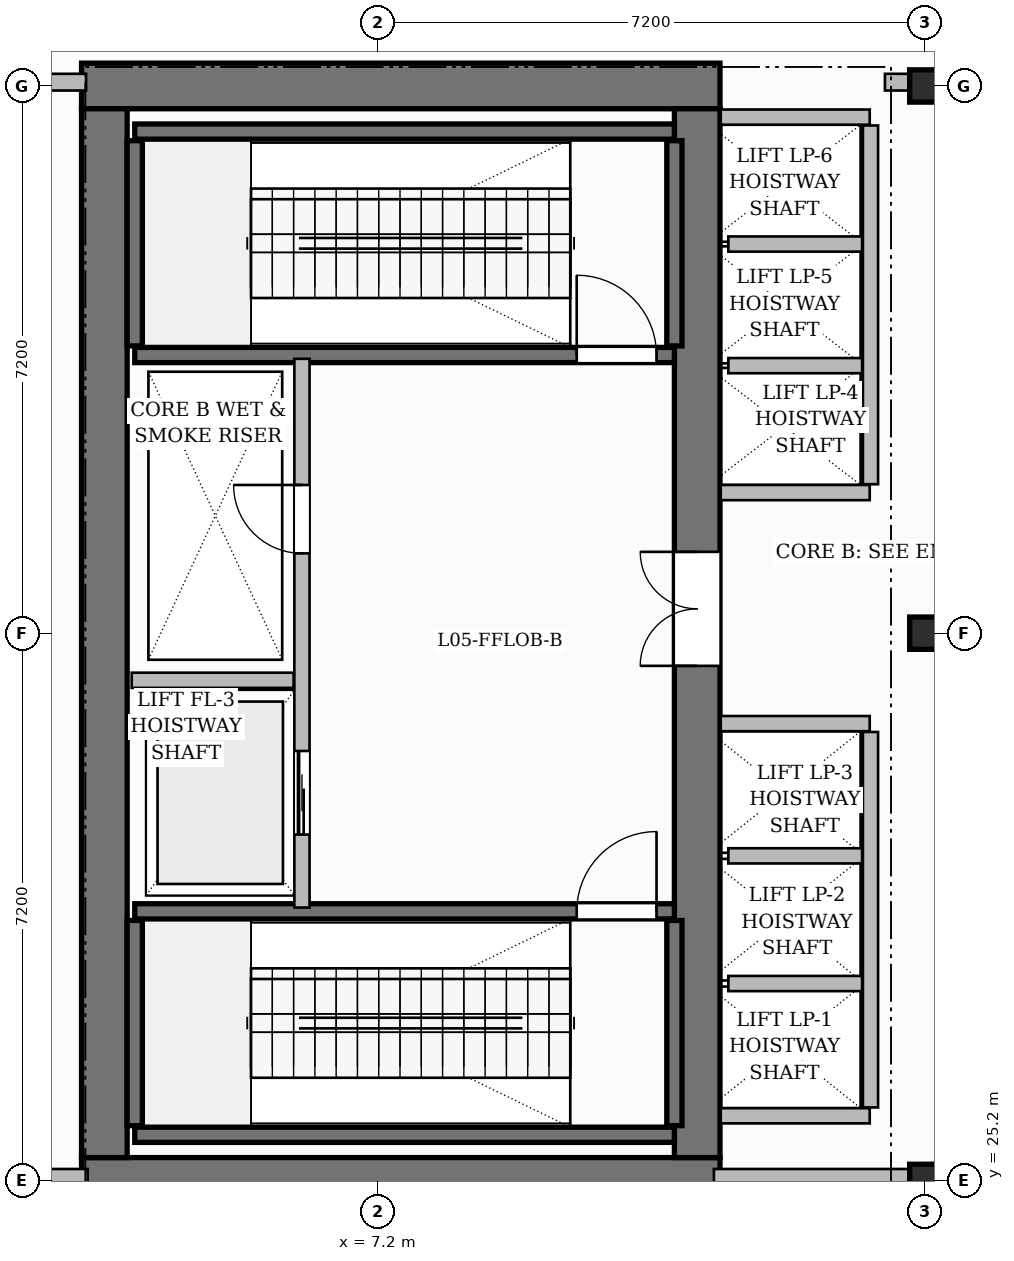
"""IFC4 building model, lengths in metres.
Left out: names, types, materials, properties, quantities, classifications, styles, units other than length and angle.
Written with IfcOpenShell. Run it as: python <this file> out.ifc"""

import sys

from ifc_helpers import new_model, si_unit, direction, frame, frame_2d, origin, origin_2d, place, context, subcontext, project, spatial, rectangle, i_section, extrude, source, transform, mapped, element, fill, save


model = new_model("IFC4")
c1 = context("Model", 3, precision=1e-05, world=origin(), true_north=direction((0.0, 1.0)))
c2 = subcontext(c1, "Body", "Model", "MODEL_VIEW")
j1 = project(units=[si_unit("LENGTHUNIT", "METRE"), si_unit("PLANEANGLEUNIT", "RADIAN")], contexts=[c1])
p1 = place(None, origin())
s1 = spatial("IfcSite", under=j1, at=p1, CompositionType="ELEMENT")
p2 = place(p1, origin())
s2 = spatial("IfcBuilding", under=s1, at=p2, CompositionType="ELEMENT")
p3 = place(p2, frame((0.0, 0.0, 27.0)))
s3 = spatial("IfcBuildingStorey", under=s2, at=p3, CompositionType="ELEMENT", Elevation=27.0)
for number, where, z_axis, x_axis in (
    (1, (3.3, 25.2, 0.0), (0.0, 0.0, 1.0), (1.0, 0.0, 0.0)),
    (2, (3.3, 39.6, 0.0), (0.0, 0.0, 1.0), (1.0, 0.0, 0.0)),
):
    element("IfcWall", number, at=place(p3, frame(where, z_axis=z_axis, x_axis=x_axis)), inside=s3, PredefinedType="SHEAR", context=c2, shape_type="SweptSolid", body=[
        extrude(rectangle(XDim=8.4, YDim=0.6, at=frame_2d((4.2, 0.0))), origin(), (0.0, 0.0, 1.0), 5.4),
    ])
p4 = place(p3, frame((3.6, 25.5, 0.0), z_axis=(0.0, 0.0, 1.0), x_axis=(0.0, 1.0, 0.0)))
e3 = element("IfcWall", 3, at=p4, inside=s3, PredefinedType="SHEAR", context=c2, shape_type="SweptSolid", body=[
    extrude(rectangle(XDim=13.8, YDim=0.6, at=frame_2d((6.9, 0.0))), origin(), (0.0, 0.0, 1.0), 5.4),
])
p5 = place(p3, frame((11.4, 25.5, 0.0), z_axis=(0.0, 0.0, 1.0), x_axis=(0.0, 1.0, 0.0)))
e4 = element("IfcWall", 4, at=p5, inside=s3, PredefinedType="SHEAR", context=c2, shape_type="SweptSolid", body=[
    extrude(rectangle(XDim=13.8, YDim=0.6, at=frame_2d((6.9, 0.0))), origin(), (0.0, 0.0, 1.0), 5.4),
])
p6 = place(p5, frame((6.47, 0.0, 0.0)))
e5 = element("IfcOpeningElement", 5, at=p6, cuts=e4, PredefinedType="OPENING", context=c2, shape_type="SweptSolid", body=[
    extrude(rectangle(XDim=1.5, YDim=2.2, at=frame_2d((0.75, 1.1))), frame((0.0, 0.31, 0.0), z_axis=(0.0, -1.0, 0.0), x_axis=(1.0, 0.0, 0.0)), (0.0, 0.0, 1.0), 0.62),
])
m1 = source(origin(), c2, "Body", "SweptSolid", [
    extrude(i_section(OverallWidth=0.409, OverallDepth=0.425, WebThickness=0.024, FlangeThickness=0.039, FilletRadius=0.015, at=origin_2d()), origin(), (0.0, 0.0, 1.0), 5.4),
])
for number, where, z_axis, x_axis in (
    (6, (14.4, 25.2, 0.0), (0.0, 0.0, 1.0), (1.0, 0.0, 0.0)),
    (7, (14.4, 32.4, 0.0), (0.0, 0.0, 1.0), (1.0, 0.0, 0.0)),
    (8, (14.4, 39.6, 0.0), (0.0, 0.0, 1.0), (1.0, 0.0, 0.0)),
):
    element("IfcColumn", number, at=place(p3, frame(where, z_axis=z_axis, x_axis=x_axis)), inside=s3, PredefinedType="COLUMN", context=c2, shape_type="MappedRepresentation", body=[
        mapped(m1, transform((0.0, 0.0, 0.0), scale=1.0)),
    ])
p7 = place(p3, frame((4.0, 25.8, 0.0), z_axis=(0.0, 0.0, 1.0), x_axis=(1.0, 0.0, 0.0)))
e9 = element("IfcWall", 9, at=p7, inside=s3, PredefinedType="SHEAR", context=c2, shape_type="SweptSolid", body=[
    extrude(rectangle(XDim=7.1, YDim=0.2, at=frame_2d((3.55, 0.0))), origin(), (0.0, 0.0, 1.0), 5.4),
])
for number, where, z_axis, x_axis in (
    (10, (4.0, 25.92, 0.0), (0.0, 0.0, 1.0), (0.0, 1.0, 0.0)),
    (11, (11.1, 25.92, 0.0), (0.0, 0.0, 1.0), (0.0, 1.0, 0.0)),
):
    element("IfcWall", number, at=place(p3, frame(where, z_axis=z_axis, x_axis=x_axis)), inside=s3, PredefinedType="SHEAR", context=c2, shape_type="SweptSolid", body=[
        extrude(rectangle(XDim=2.7, YDim=0.2, at=frame_2d((1.35, 0.0))), origin(), (0.0, 0.0, 1.0), 5.4),
    ])
p8 = place(p3, frame((4.0, 28.74, 0.0), z_axis=(0.0, 0.0, 1.0), x_axis=(1.0, 0.0, 0.0)))
e12 = element("IfcWall", 12, at=p8, inside=s3, PredefinedType="SHEAR", context=c2, shape_type="SweptSolid", body=[
    extrude(rectangle(XDim=7.1, YDim=0.2, at=frame_2d((3.55, 0.0))), origin(), (0.0, 0.0, 1.0), 5.4),
])
p9 = place(p8, frame((5.815, 0.0, 0.0)))
e13 = element("IfcOpeningElement", 13, at=p9, cuts=e12, PredefinedType="OPENING", context=c2, shape_type="SweptSolid", body=[
    extrude(rectangle(XDim=1.05, YDim=2.2, at=frame_2d((0.525, 1.1))), frame((0.0, 0.11, 0.0), z_axis=(0.0, -1.0, 0.0), x_axis=(1.0, 0.0, 0.0)), (0.0, 0.0, 1.0), 0.22),
])
p10 = place(p3, frame((4.0, 39.0, 0.0), z_axis=(0.0, 0.0, 1.0), x_axis=(1.0, 0.0, 0.0)))
e14 = element("IfcWall", 14, at=p10, inside=s3, PredefinedType="SHEAR", context=c2, shape_type="SweptSolid", body=[
    extrude(rectangle(XDim=7.1, YDim=0.2, at=frame_2d((3.55, 0.0))), origin(), (0.0, 0.0, 1.0), 5.4),
])
for number, where, z_axis, x_axis in (
    (15, (4.0, 36.18, 0.0), (0.0, 0.0, 1.0), (0.0, 1.0, 0.0)),
    (16, (11.1, 36.18, 0.0), (0.0, 0.0, 1.0), (0.0, 1.0, 0.0)),
):
    element("IfcWall", number, at=place(p3, frame(where, z_axis=z_axis, x_axis=x_axis)), inside=s3, PredefinedType="SHEAR", context=c2, shape_type="SweptSolid", body=[
        extrude(rectangle(XDim=2.7, YDim=0.2, at=frame_2d((1.35, 0.0))), origin(), (0.0, 0.0, 1.0), 5.4),
    ])
p11 = place(p3, frame((4.0, 36.06, 0.0), z_axis=(0.0, 0.0, 1.0), x_axis=(1.0, 0.0, 0.0)))
e17 = element("IfcWall", 17, at=p11, inside=s3, PredefinedType="SHEAR", context=c2, shape_type="SweptSolid", body=[
    extrude(rectangle(XDim=7.1, YDim=0.2, at=frame_2d((3.55, 0.0))), origin(), (0.0, 0.0, 1.0), 5.4),
])
p12 = place(p11, frame((5.815, 0.0, 0.0)))
e18 = element("IfcOpeningElement", 18, at=p12, cuts=e17, PredefinedType="OPENING", context=c2, shape_type="SweptSolid", body=[
    extrude(rectangle(XDim=1.05, YDim=2.2, at=frame_2d((0.525, 1.1))), frame((0.0, 0.11, 0.0), z_axis=(0.0, -1.0, 0.0), x_axis=(1.0, 0.0, 0.0)), (0.0, 0.0, 1.0), 0.22),
])
p13 = place(p3, frame((6.2, 28.79, 0.0), z_axis=(0.0, 0.0, 1.0), x_axis=(0.0, 1.0, 0.0)))
e19 = element("IfcWall", 19, at=p13, inside=s3, PredefinedType="PARTITIONING", context=c2, shape_type="SweptSolid", body=[
    extrude(rectangle(XDim=7.22, YDim=0.2, at=frame_2d((3.61, 0.0))), origin(), (0.0, 0.0, 1.0), 5.15),
])
p14 = place(p13, frame((4.66, 0.0, 0.0)))
e20 = element("IfcOpeningElement", 20, at=p14, cuts=e19, PredefinedType="OPENING", context=c2, shape_type="SweptSolid", body=[
    extrude(rectangle(XDim=0.9, YDim=2.1, at=frame_2d((0.45, 1.05))), frame((0.0, 0.11, 0.0), z_axis=(0.0, -1.0, 0.0), x_axis=(1.0, 0.0, 0.0)), (0.0, 0.0, 1.0), 0.22),
])
p15 = place(p13, frame((0.96, 0.0, 0.0)))
e21 = element("IfcOpeningElement", 21, at=p15, cuts=e19, PredefinedType="OPENING", context=c2, shape_type="SweptSolid", body=[
    extrude(rectangle(XDim=1.1, YDim=2.2, at=frame_2d((0.55, 1.1))), frame((0.0, 0.11, 0.0), z_axis=(0.0, -1.0, 0.0), x_axis=(1.0, 0.0, 0.0)), (0.0, 0.0, 1.0), 0.22),
])
p16 = place(p3, frame((3.96, 31.78, 0.0), z_axis=(0.0, 0.0, 1.0), x_axis=(1.0, 0.0, 0.0)))
e22 = element("IfcWall", 22, at=p16, inside=s3, PredefinedType="PARTITIONING", context=c2, shape_type="SweptSolid", body=[
    extrude(rectangle(XDim=2.13, YDim=0.2, at=frame_2d((1.065, 0.0))), origin(), (0.0, 0.0, 1.0), 5.15),
])
for number, where, z_axis, x_axis in (
    (23, (11.71, 26.05, 0.0), (0.0, 0.0, 1.0), (1.0, 0.0, 0.0)),
    (24, (11.71, 31.21, 0.0), (0.0, 0.0, 1.0), (1.0, 0.0, 0.0)),
):
    element("IfcWall", number, at=place(p3, frame(where, z_axis=z_axis, x_axis=x_axis)), inside=s3, PredefinedType="PARTITIONING", context=c2, shape_type="SweptSolid", body=[
        extrude(rectangle(XDim=1.96, YDim=0.2, at=frame_2d((0.98, 0.0))), origin(), (0.0, 0.0, 1.0), 5.15),
    ])
p17 = place(p3, frame((13.68, 26.16, 0.0), z_axis=(0.0, 0.0, 1.0), x_axis=(0.0, 1.0, 0.0)))
e25 = element("IfcWall", 25, at=p17, inside=s3, PredefinedType="PARTITIONING", context=c2, shape_type="SweptSolid", body=[
    extrude(rectangle(XDim=4.94, YDim=0.2, at=frame_2d((2.47, 0.0))), origin(), (0.0, 0.0, 1.0), 5.15),
])
for number, where, z_axis, x_axis in (
    (26, (11.81, 27.79, 0.0), (0.0, 0.0, 1.0), (1.0, 0.0, 0.0)),
    (27, (11.81, 29.47, 0.0), (0.0, 0.0, 1.0), (1.0, 0.0, 0.0)),
):
    element("IfcWall", number, at=place(p3, frame(where, z_axis=z_axis, x_axis=x_axis)), inside=s3, PredefinedType="PARTITIONING", context=c2, shape_type="SweptSolid", body=[
        extrude(rectangle(XDim=1.76, YDim=0.2, at=frame_2d((0.88, 0.0))), origin(), (0.0, 0.0, 1.0), 5.15),
    ])
for number, where, z_axis, x_axis in (
    (28, (11.71, 34.25, 0.0), (0.0, 0.0, 1.0), (1.0, 0.0, 0.0)),
    (29, (11.71, 39.19, 0.0), (0.0, 0.0, 1.0), (1.0, 0.0, 0.0)),
):
    element("IfcWall", number, at=place(p3, frame(where, z_axis=z_axis, x_axis=x_axis)), inside=s3, PredefinedType="PARTITIONING", context=c2, shape_type="SweptSolid", body=[
        extrude(rectangle(XDim=1.96, YDim=0.2, at=frame_2d((0.98, 0.0))), origin(), (0.0, 0.0, 1.0), 5.15),
    ])
p18 = place(p3, frame((13.68, 34.36, 0.0), z_axis=(0.0, 0.0, 1.0), x_axis=(0.0, 1.0, 0.0)))
e30 = element("IfcWall", 30, at=p18, inside=s3, PredefinedType="PARTITIONING", context=c2, shape_type="SweptSolid", body=[
    extrude(rectangle(XDim=4.72, YDim=0.2, at=frame_2d((2.36, 0.0))), origin(), (0.0, 0.0, 1.0), 5.15),
])
for number, where, z_axis, x_axis in (
    (31, (11.81, 35.92, 0.0), (0.0, 0.0, 1.0), (1.0, 0.0, 0.0)),
    (32, (11.81, 37.52, 0.0), (0.0, 0.0, 1.0), (1.0, 0.0, 0.0)),
):
    element("IfcWall", number, at=place(p3, frame(where, z_axis=z_axis, x_axis=x_axis)), inside=s3, PredefinedType="PARTITIONING", context=c2, shape_type="SweptSolid", body=[
        extrude(rectangle(XDim=1.76, YDim=0.2, at=frame_2d((0.88, 0.0))), origin(), (0.0, 0.0, 1.0), 5.15),
    ])
p19 = place(p3, frame((13.87, 39.65, 0.0), z_axis=(0.0, 0.0, 1.0), x_axis=(1.0, 0.0, 0.0)))
e33 = element("IfcWall", 33, at=p19, inside=s3, PredefinedType="PARTITIONING", context=c2, shape_type="SweptSolid", body=[
    extrude(rectangle(XDim=3.89, YDim=0.22, at=frame_2d((1.945, 0.0))), origin(), (0.0, 0.0, 1.0), 4.485),
])
p20 = place(p19, frame((1.23, 0.0, 0.0)))
e34 = element("IfcOpeningElement", 34, at=p20, cuts=e33, PredefinedType="OPENING", context=c2, shape_type="SweptSolid", body=[
    extrude(rectangle(XDim=1.5, YDim=2.2, at=frame_2d((0.75, 1.1))), frame((0.0, 0.12, 0.0), z_axis=(0.0, -1.0, 0.0), x_axis=(1.0, 0.0, 0.0)), (0.0, 0.0, 1.0), 0.24),
])
p21 = place(p3, frame((0.29, 39.65, 0.0), z_axis=(0.0, 0.0, 1.0), x_axis=(1.0, 0.0, 0.0)))
e35 = element("IfcWall", 35, at=p21, inside=s3, PredefinedType="PARTITIONING", context=c2, shape_type="SweptSolid", body=[
    extrude(rectangle(XDim=3.07, YDim=0.22, at=frame_2d((1.535, 0.0))), origin(), (0.0, 0.0, 1.0), 5.15),
])
p22 = place(p3, frame((11.62, 25.2, 0.0), z_axis=(0.0, 0.0, 1.0), x_axis=(1.0, 0.0, 0.0)))
e36 = element("IfcWall", 36, at=p22, inside=s3, PredefinedType="SOLIDWALL", context=c2, shape_type="SweptSolid", body=[
    extrude(rectangle(XDim=2.78, YDim=0.3, at=frame_2d((1.39, 0.0))), origin(), (0.0, 0.0, 1.0), 4.485),
])
p23 = place(p3, frame((0.0, 25.2, 0.0), z_axis=(0.0, 0.0, 1.0), x_axis=(1.0, 0.0, 0.0)))
e37 = element("IfcWall", 37, at=p23, inside=s3, PredefinedType="SOLIDWALL", context=c2, shape_type="SweptSolid", body=[
    extrude(rectangle(XDim=3.38, YDim=0.3, at=frame_2d((1.69, 0.0))), origin(), (0.0, 0.0, 1.0), 5.15),
])
m2 = source(origin(), c2, "Body", "SweptSolid", [
    extrude(rectangle(XDim=1.05, YDim=2.2, at=frame_2d((0.525, 1.1))), frame((0.0, 0.025, 0.0), z_axis=(0.0, -1.0, 0.0), x_axis=(1.0, 0.0, 0.0)), (0.0, 0.0, 1.0), 0.05),
])
p24 = place(p9, origin())
e38 = element("IfcDoor", 38, at=p24, inside=s3, OperationType="SINGLE_SWING_RIGHT", PredefinedType="DOOR", context=c2, shape_type="MappedRepresentation", body=[
    mapped(m2, transform((0.0, 0.0, 0.0), scale=1.0)),
])
fill(e13, e38)
p25 = place(p12, origin())
e39 = element("IfcDoor", 39, at=p25, inside=s3, OperationType="SINGLE_SWING_LEFT", PredefinedType="DOOR", context=c2, shape_type="MappedRepresentation", body=[
    mapped(m2, transform((0.0, 0.0, 0.0), scale=1.0)),
])
fill(e18, e39)
m3 = source(origin(), c2, "Body", "SweptSolid", [
    extrude(rectangle(XDim=0.9, YDim=2.1, at=frame_2d((0.45, 1.05))), frame((0.0, 0.025, 0.0), z_axis=(0.0, -1.0, 0.0), x_axis=(1.0, 0.0, 0.0)), (0.0, 0.0, 1.0), 0.05),
])
p26 = place(p14, origin())
e40 = element("IfcDoor", 40, at=p26, inside=s3, OperationType="SINGLE_SWING_RIGHT", PredefinedType="DOOR", context=c2, shape_type="MappedRepresentation", body=[
    mapped(m3, transform((0.0, 0.0, 0.0), scale=1.0)),
])
fill(e20, e40)
m4 = source(origin(), c2, "Body", "SweptSolid", [
    extrude(rectangle(XDim=1.5, YDim=2.2, at=frame_2d((0.75, 1.1))), frame((0.0, 0.025, 0.0), z_axis=(0.0, -1.0, 0.0), x_axis=(1.0, 0.0, 0.0)), (0.0, 0.0, 1.0), 0.05),
])
p27 = place(p6, origin())
e41 = element("IfcDoor", 41, at=p27, inside=s3, OperationType="DOUBLE_DOOR_SINGLE_SWING", PredefinedType="DOOR", context=c2, shape_type="MappedRepresentation", body=[
    mapped(m4, transform((0.0, 0.0, 0.0), scale=1.0)),
])
fill(e5, e41)
m5 = source(origin(), c2, "Body", "SweptSolid", [
    extrude(rectangle(XDim=1.1, YDim=2.2, at=frame_2d((0.55, 1.1))), frame((0.0, 0.025, 0.0), z_axis=(0.0, -1.0, 0.0), x_axis=(1.0, 0.0, 0.0)), (0.0, 0.0, 1.0), 0.05),
])
p28 = place(p15, origin())
e42 = element("IfcDoor", 42, at=p28, inside=s3, OperationType="SLIDING_TO_LEFT", PredefinedType="DOOR", context=c2, shape_type="MappedRepresentation", body=[
    mapped(m5, transform((0.0, 0.0, 0.0), scale=1.0)),
])
fill(e21, e42)
save(model, sys.argv[1])
